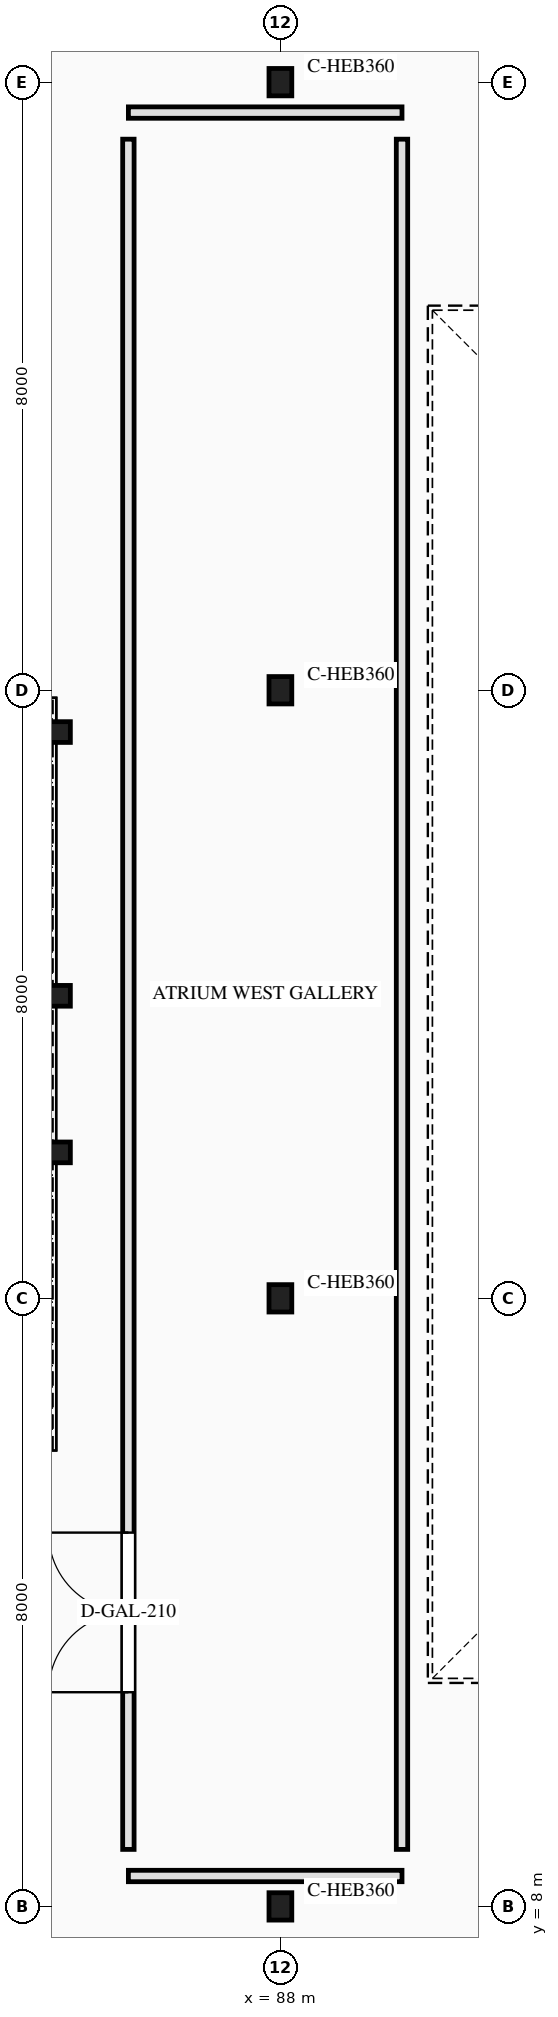
"""IFC4 building model, lengths in metres.
Left out: names, types, materials, properties, quantities, classifications, styles, units other than length and angle.
Written with IfcOpenShell. Run it as: python <this file> out.ifc"""

import sys

from ifc_helpers import new_model, si_unit, direction, frame, frame_2d, origin, origin_2d, place, context, subcontext, project, spatial, rectangle, hollow_circle, i_section, extrude, element, fill, save


model = new_model("IFC4")
c1 = context("Model", 3, precision=1e-05, world=origin(), true_north=direction((0.0, 1.0)))
c2 = subcontext(c1, "Body", "Model", "MODEL_VIEW")
j1 = project(units=[si_unit("LENGTHUNIT", "METRE"), si_unit("PLANEANGLEUNIT", "RADIAN")], contexts=[c1])
p1 = place(None, origin())
s1 = spatial("IfcSite", under=j1, at=p1, CompositionType="ELEMENT")
p2 = place(p1, origin())
s2 = spatial("IfcBuilding", under=s1, at=p2, CompositionType="ELEMENT")
p3 = place(p2, frame((0.0, 0.0, 5.4)))
s3 = spatial("IfcBuildingStorey", under=s2, at=p3, CompositionType="ELEMENT", Elevation=5.4)
for number, where, z_axis, x_axis in (
    (1, (88.0, 8.0, 0.0), (0.0, 0.0, 1.0), (1.0, 0.0, 0.0)),
    (2, (88.0, 16.0, 0.0), (0.0, 0.0, 1.0), (1.0, 0.0, 0.0)),
    (3, (88.0, 24.0, 0.0), (0.0, 0.0, 1.0), (1.0, 0.0, 0.0)),
    (4, (88.0, 32.0, 0.0), (0.0, 0.0, 1.0), (1.0, 0.0, 0.0)),
):
    element("IfcColumn", number, at=place(p3, frame(where, z_axis=z_axis, x_axis=x_axis)), inside=s3, PredefinedType="COLUMN", context=c2, shape_type="SweptSolid", body=[
        extrude(i_section(OverallWidth=0.3, OverallDepth=0.36, WebThickness=0.012, FlangeThickness=0.022, FilletRadius=0.027, at=origin_2d()), origin(), (0.0, 0.0, 1.0), 4.2),
    ])
for number, where, z_axis, x_axis in (
    (5, (85.1, 17.92, 0.0), (0.0, 0.0, 1.0), (1.0, 0.0, 0.0)),
    (6, (85.1, 19.98, 0.0), (0.0, 0.0, 1.0), (1.0, 0.0, 0.0)),
):
    element("IfcColumn", number, at=place(p3, frame(where, z_axis=z_axis, x_axis=x_axis)), inside=s3, PredefinedType="COLUMN", context=c2, shape_type="SweptSolid", body=[
        extrude(hollow_circle(Radius=0.136, WallThickness=0.012, at=origin_2d()), origin(), (0.0, 0.0, 1.0), 1.78),
    ])
p4 = place(p3, frame((85.1, 23.45, 0.0), z_axis=(0.0, 0.0, 1.0), x_axis=(1.0, 0.0, 0.0)))
e7 = element("IfcColumn", 7, at=p4, inside=s3, PredefinedType="COLUMN", context=c2, shape_type="SweptSolid", body=[
    extrude(hollow_circle(Radius=0.136, WallThickness=0.012, at=origin_2d()), origin(), (0.0, 0.0, 1.0), 3.66),
])
for number, where, z_axis, x_axis in (
    (8, (86.0, 31.6, 0.0), (0.0, 0.0, 1.0), (1.0, 0.0, 0.0)),
    (9, (86.0, 8.4, 0.0), (0.0, 0.0, 1.0), (1.0, 0.0, 0.0)),
):
    element("IfcWall", number, at=place(p3, frame(where, z_axis=z_axis, x_axis=x_axis)), inside=s3, PredefinedType="PARTITIONING", context=c2, shape_type="SweptSolid", body=[
        extrude(rectangle(XDim=3.6, YDim=0.15, at=frame_2d((1.8, 0.0))), origin(), (0.0, 0.0, 1.0), 3.94),
    ])
p5 = place(p3, frame((86.0, 8.75, 0.0), z_axis=(0.0, 0.0, 1.0), x_axis=(0.0, 1.0, 0.0)))
e10 = element("IfcWall", 10, at=p5, inside=s3, PredefinedType="PARTITIONING", context=c2, shape_type="SweptSolid", body=[
    extrude(rectangle(XDim=22.5, YDim=0.15, at=frame_2d((11.25, 0.0))), origin(), (0.0, 0.0, 1.0), 3.94),
])
p6 = place(p5, frame((2.068, 0.0, 0.0)))
e11 = element("IfcOpeningElement", 11, at=p6, cuts=e10, PredefinedType="OPENING", context=c2, shape_type="SweptSolid", body=[
    extrude(rectangle(XDim=2.1, YDim=2.6, at=frame_2d((1.05, 1.3))), frame((0.0, 0.085, 0.0), z_axis=(0.0, -1.0, 0.0), x_axis=(1.0, 0.0, 0.0)), (0.0, 0.0, 1.0), 0.17),
])
p7 = place(p3, frame((89.6, 8.75, 0.0), z_axis=(0.0, 0.0, 1.0), x_axis=(0.0, 1.0, 0.0)))
e12 = element("IfcWall", 12, at=p7, inside=s3, PredefinedType="PARTITIONING", context=c2, shape_type="SweptSolid", body=[
    extrude(rectangle(XDim=22.5, YDim=0.15, at=frame_2d((11.25, 0.0))), origin(), (0.0, 0.0, 1.0), 3.94),
])
p8 = place(p6, origin())
e13 = element("IfcDoor", 13, at=p8, inside=s3, OperationType="DOUBLE_DOOR_SINGLE_SWING", PredefinedType="DOOR", context=c2, shape_type="SweptSolid", body=[
    extrude(rectangle(XDim=2.1, YDim=2.6, at=frame_2d((1.05, 1.3))), frame((0.0, 0.025, 0.0), z_axis=(0.0, -1.0, 0.0), x_axis=(1.0, 0.0, 0.0)), (0.0, 0.0, 1.0), 0.05),
])
fill(e11, e13)
save(model, sys.argv[1])
